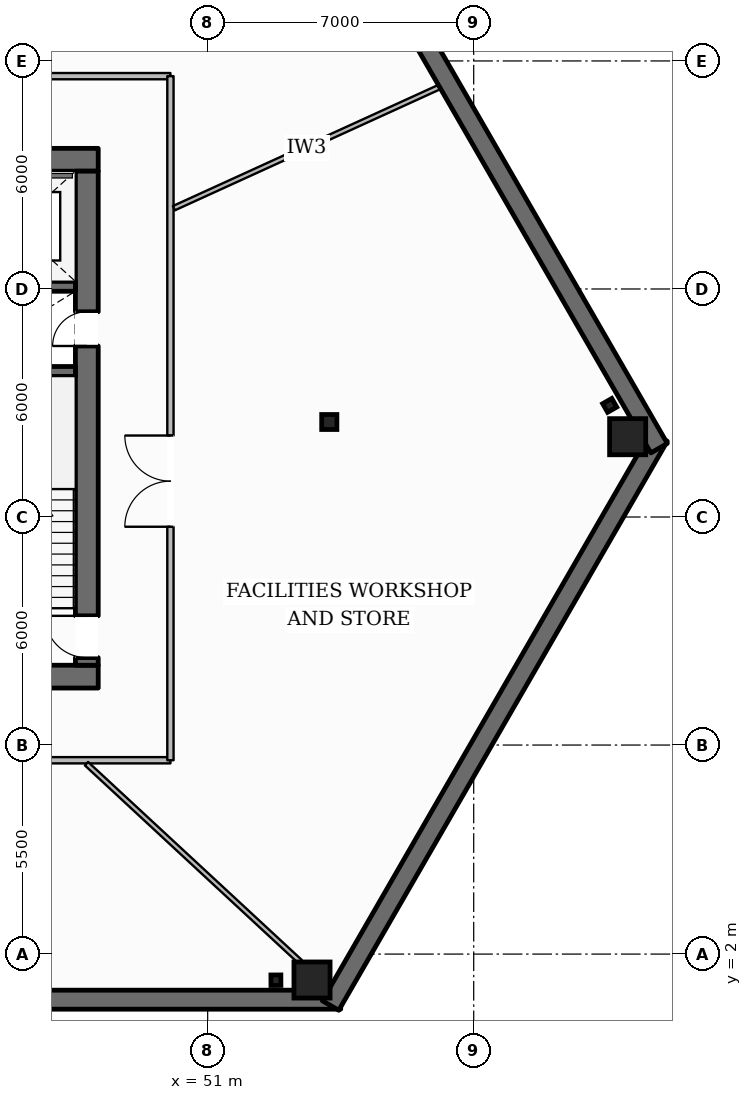
"""IFC4 building model, lengths in metres.
Left out: names, types, materials, properties, quantities, classifications, styles, units other than length and angle.
Written with IfcOpenShell. Run it as: python <this file> out.ifc"""

import sys

from ifc_helpers import new_model, si_unit, direction, frame, frame_2d, origin, origin_2d, place, context, subcontext, project, spatial, rectangle, hollow_rectangle, i_section, extrude, element, fill, save


model = new_model("IFC4")
c1 = context("Model", 3, precision=1e-05, world=origin(), true_north=direction((0.0, 1.0)))
c2 = subcontext(c1, "Body", "Model", "MODEL_VIEW")
j1 = project(units=[si_unit("LENGTHUNIT", "METRE"), si_unit("PLANEANGLEUNIT", "RADIAN")], contexts=[c1])
p1 = place(None, origin())
s1 = spatial("IfcSite", under=j1, at=p1, CompositionType="ELEMENT")
p2 = place(p1, origin())
s2 = spatial("IfcBuilding", under=s1, at=p2, CompositionType="ELEMENT")
p3 = place(p2, frame((0.0, 0.0, -4.2)))
s3 = spatial("IfcBuildingStorey", under=s2, at=p3, CompositionType="ELEMENT", Elevation=-4.2)
p4 = place(p3, frame((21.5, 0.8, 0.0), z_axis=(0.0, 0.0, 1.0), x_axis=(1.0, 0.0, 0.0)))
e1 = element("IfcWall", 1, at=p4, inside=s3, PredefinedType="SHEAR", context=c2, shape_type="SweptSolid", body=[
    extrude(rectangle(XDim=33.0, YDim=0.5, at=frame_2d((16.5, 0.0))), origin(), (0.0, 0.0, 1.0), 3.94),
])
p5 = place(p3, frame((54.233, 0.646, 0.0), z_axis=(0.0, 0.0, 1.0), x_axis=(0.499998305863, 0.866026381893, 0.0)))
e2 = element("IfcWall", 2, at=p5, inside=s3, PredefinedType="SHEAR", context=c2, shape_type="SweptSolid", body=[
    extrude(rectangle(XDim=17.289, YDim=0.5, at=frame_2d((8.644, 0.0))), origin(), (0.0, 0.0, 1.0), 3.94),
])
p6 = place(p3, frame((62.878, 15.311, 0.0), z_axis=(0.0, 0.0, 1.0), x_axis=(-0.499999749417, 0.866025548458, 0.0)))
e3 = element("IfcWall", 3, at=p6, inside=s3, PredefinedType="SHEAR", context=c2, shape_type="SweptSolid", body=[
    extrude(rectangle(XDim=33.0, YDim=0.5, at=frame_2d((16.5, 0.0))), origin(), (0.0, 0.0, 1.0), 3.94),
])
p7 = place(p3, frame((27.88, 9.3, 0.0), z_axis=(0.0, 0.0, 1.0), x_axis=(1.0, 0.0, 0.0)))
e4 = element("IfcWall", 4, at=p7, inside=s3, PredefinedType="SOLIDWALL", context=c2, shape_type="SweptSolid", body=[
    extrude(rectangle(XDim=20.24, YDim=0.6, at=frame_2d((10.12, 0.0))), origin(), (0.0, 0.0, 1.0), 3.94),
])
p8 = place(p7, frame((10.795, 0.0, 0.0)))
e5 = element("IfcOpeningElement", 5, at=p8, cuts=e4, PredefinedType="OPENING", context=c2, shape_type="SweptSolid", body=[
    extrude(rectangle(XDim=1.05, YDim=2.15, at=frame_2d((0.525, 1.075))), frame((0.0, 0.31, 0.0), z_axis=(0.0, -1.0, 0.0), x_axis=(1.0, 0.0, 0.0)), (0.0, 0.0, 1.0), 0.62),
])
p9 = place(p3, frame((27.88, 22.9, 0.0), z_axis=(0.0, 0.0, 1.0), x_axis=(1.0, 0.0, 0.0)))
e6 = element("IfcWall", 6, at=p9, inside=s3, PredefinedType="SOLIDWALL", context=c2, shape_type="SweptSolid", body=[
    extrude(rectangle(XDim=20.24, YDim=0.6, at=frame_2d((10.12, 0.0))), origin(), (0.0, 0.0, 1.0), 3.94),
])
p10 = place(p9, frame((6.395, 0.0, 0.0)))
e7 = element("IfcOpeningElement", 7, at=p10, cuts=e6, PredefinedType="OPENING", context=c2, shape_type="SweptSolid", body=[
    extrude(rectangle(XDim=1.05, YDim=2.15, at=frame_2d((0.525, 1.075))), frame((0.0, 0.31, 0.0), z_axis=(0.0, -1.0, 0.0), x_axis=(1.0, 0.0, 0.0)), (0.0, 0.0, 1.0), 0.62),
])
p11 = place(p9, frame((12.795, 0.0, 0.0)))
e8 = element("IfcOpeningElement", 8, at=p11, cuts=e6, PredefinedType="OPENING", context=c2, shape_type="SweptSolid", body=[
    extrude(rectangle(XDim=1.05, YDim=2.15, at=frame_2d((0.525, 1.075))), frame((0.0, 0.31, 0.0), z_axis=(0.0, -1.0, 0.0), x_axis=(1.0, 0.0, 0.0)), (0.0, 0.0, 1.0), 0.62),
])
p12 = place(p3, frame((47.82, 9.6, 0.0), z_axis=(0.0, 0.0, 1.0), x_axis=(0.0, 1.0, 0.0)))
e9 = element("IfcWall", 9, at=p12, inside=s3, PredefinedType="SOLIDWALL", context=c2, shape_type="SweptSolid", body=[
    extrude(rectangle(XDim=13.0, YDim=0.6, at=frame_2d((6.5, 0.0))), origin(), (0.0, 0.0, 1.0), 3.94),
])
p13 = place(p12, frame((0.2, 0.0, 0.0)))
e10 = element("IfcOpeningElement", 10, at=p13, cuts=e9, PredefinedType="OPENING", context=c2, shape_type="SweptSolid", body=[
    extrude(rectangle(XDim=1.1, YDim=2.15, at=frame_2d((0.55, 1.075))), frame((0.0, 0.31, 0.0), z_axis=(0.0, -1.0, 0.0), x_axis=(1.0, 0.0, 0.0)), (0.0, 0.0, 1.0), 0.62),
])
p14 = place(p12, frame((8.4, 0.0, 0.0)))
e11 = element("IfcOpeningElement", 11, at=p14, cuts=e9, PredefinedType="OPENING", context=c2, shape_type="SweptSolid", body=[
    extrude(rectangle(XDim=0.9, YDim=2.1, at=frame_2d((0.45, 1.05))), frame((0.0, 0.31, 0.0), z_axis=(0.0, -1.0, 0.0), x_axis=(1.0, 0.0, 0.0)), (0.0, 0.0, 1.0), 0.62),
])
for number, where, z_axis, x_axis in (
    (12, (44.32, 17.33, 0.0), (0.0, 0.0, 1.0), (1.0, 0.0, 0.0)),
    (13, (44.32, 19.57, 0.0), (0.0, 0.0, 1.0), (1.0, 0.0, 0.0)),
):
    element("IfcWall", number, at=place(p3, frame(where, z_axis=z_axis, x_axis=x_axis)), inside=s3, PredefinedType="SHEAR", context=c2, shape_type="SweptSolid", body=[
        extrude(rectangle(XDim=3.2, YDim=0.26, at=frame_2d((1.6, 0.0))), origin(), (0.0, 0.0, 1.0), 3.94),
    ])
for number, where, z_axis, x_axis in (
    (14, (53.746, 1.318, 0.0), (0.0, 0.0, 1.0), (1.0, 0.0, 0.0)),
    (15, (62.051, 15.613, 0.0), (0.0, 0.0, 1.0), (1.0, 0.0, 0.0)),
):
    element("IfcColumn", number, at=place(p3, frame(where, z_axis=z_axis, x_axis=x_axis)), inside=s3, PredefinedType="COLUMN", context=c2, shape_type="SweptSolid", body=[
        extrude(hollow_rectangle(XDim=0.95, YDim=0.95, WallThickness=0.04, at=origin_2d()), origin(), (0.0, 0.0, 1.0), 3.94),
    ])
for number, where, z_axis, x_axis in (
    (16, (52.795, 1.312, 0.0), (0.0, 0.0, 1.0), (1.0, 0.005, 0.0)),
    (17, (61.578, 16.437, 0.0), (0.0, 0.0, 1.0), (-0.498, 0.867, 0.0)),
):
    element("IfcColumn", number, at=place(p3, frame(where, z_axis=z_axis, x_axis=x_axis)), inside=s3, PredefinedType="PILASTER", context=c2, shape_type="SweptSolid", body=[
        extrude(i_section(OverallWidth=0.261, OverallDepth=0.276, WebThickness=0.015, FlangeThickness=0.025, at=origin_2d()), origin(), (0.0, 0.0, 1.0), 3.94),
    ])
p15 = place(p3, frame((54.2, 16.0, 0.0), z_axis=(0.0, 0.0, 1.0), x_axis=(1.0, 0.0, 0.0)))
e18 = element("IfcColumn", 18, at=p15, inside=s3, PredefinedType="COLUMN", context=c2, shape_type="SweptSolid", body=[
    extrude(i_section(OverallWidth=0.399, OverallDepth=0.394, WebThickness=0.023, FlangeThickness=0.037, at=origin_2d()), origin(), (0.0, 0.0, 1.0), 3.94),
])
p16 = place(p3, frame((25.98, 25.1, 0.0), z_axis=(0.0, 0.0, 1.0), x_axis=(1.0, 0.0, 0.0)))
e19 = element("IfcWall", 19, at=p16, inside=s3, PredefinedType="PARTITIONING", context=c2, shape_type="SweptSolid", body=[
    extrude(rectangle(XDim=24.04, YDim=0.165, at=frame_2d((12.02, 0.0))), origin(), (0.0, 0.0, 1.0), 3.94),
])
p17 = place(p16, frame((15.372, 0.0, 0.0)))
e20 = element("IfcOpeningElement", 20, at=p17, cuts=e19, PredefinedType="OPENING", context=c2, shape_type="SweptSolid", body=[
    extrude(rectangle(XDim=2.4, YDim=2.4, at=frame_2d((1.2, 1.2))), frame((0.0, 0.093, 0.0), z_axis=(0.0, -1.0, 0.0), x_axis=(1.0, 0.0, 0.0)), (0.0, 0.0, 1.0), 0.185),
])
p18 = place(p16, frame((3.517, 0.0, 0.0)))
e21 = element("IfcOpeningElement", 21, at=p18, cuts=e19, PredefinedType="OPENING", context=c2, shape_type="SweptSolid", body=[
    extrude(rectangle(XDim=2.4, YDim=2.4, at=frame_2d((1.2, 1.2))), frame((0.0, 0.093, 0.0), z_axis=(0.0, -1.0, 0.0), x_axis=(1.0, 0.0, 0.0)), (0.0, 0.0, 1.0), 0.185),
])
p19 = place(p3, frame((25.98, 7.1, 0.0), z_axis=(0.0, 0.0, 1.0), x_axis=(1.0, 0.0, 0.0)))
e22 = element("IfcWall", 22, at=p19, inside=s3, PredefinedType="PARTITIONING", context=c2, shape_type="SweptSolid", body=[
    extrude(rectangle(XDim=24.04, YDim=0.165, at=frame_2d((12.02, 0.0))), origin(), (0.0, 0.0, 1.0), 3.94),
])
p20 = place(p19, frame((4.58, 0.0, 0.0)))
e23 = element("IfcOpeningElement", 23, at=p20, cuts=e22, PredefinedType="OPENING", context=c2, shape_type="SweptSolid", body=[
    extrude(rectangle(XDim=0.88, YDim=2.1, at=frame_2d((0.44, 1.05))), frame((0.0, 0.093, 0.0), z_axis=(0.0, -1.0, 0.0), x_axis=(1.0, 0.0, 0.0)), (0.0, 0.0, 1.0), 0.185),
])
p21 = place(p19, frame((7.1, 0.0, 0.0)))
e24 = element("IfcOpeningElement", 24, at=p21, cuts=e22, PredefinedType="OPENING", context=c2, shape_type="SweptSolid", body=[
    extrude(rectangle(XDim=0.88, YDim=2.1, at=frame_2d((0.44, 1.05))), frame((0.0, 0.093, 0.0), z_axis=(0.0, -1.0, 0.0), x_axis=(1.0, 0.0, 0.0)), (0.0, 0.0, 1.0), 0.185),
])
p22 = place(p19, frame((9.48, 0.0, 0.0)))
e25 = element("IfcOpeningElement", 25, at=p22, cuts=e22, PredefinedType="OPENING", context=c2, shape_type="SweptSolid", body=[
    extrude(rectangle(XDim=0.96, YDim=2.1, at=frame_2d((0.48, 1.05))), frame((0.0, 0.093, 0.0), z_axis=(0.0, -1.0, 0.0), x_axis=(1.0, 0.0, 0.0)), (0.0, 0.0, 1.0), 0.185),
])
p23 = place(p19, frame((15.229, 0.0, 0.0)))
e26 = element("IfcOpeningElement", 26, at=p23, cuts=e22, PredefinedType="OPENING", context=c2, shape_type="SweptSolid", body=[
    extrude(rectangle(XDim=2.4, YDim=2.4, at=frame_2d((1.2, 1.2))), frame((0.0, 0.093, 0.0), z_axis=(0.0, -1.0, 0.0), x_axis=(1.0, 0.0, 0.0)), (0.0, 0.0, 1.0), 0.185),
])
p24 = place(p3, frame((50.02, 7.1, 0.0), z_axis=(0.0, 0.0, 1.0), x_axis=(0.0, 1.0, 0.0)))
e27 = element("IfcWall", 27, at=p24, inside=s3, PredefinedType="PARTITIONING", context=c2, shape_type="SweptSolid", body=[
    extrude(rectangle(XDim=18.0, YDim=0.165, at=frame_2d((9.0, 0.0))), origin(), (0.0, 0.0, 1.0), 3.628),
])
p25 = place(p24, frame((6.144, 0.0, 0.0)))
e28 = element("IfcOpeningElement", 28, at=p25, cuts=e27, PredefinedType="OPENING", context=c2, shape_type="SweptSolid", body=[
    extrude(rectangle(XDim=2.4, YDim=2.4, at=frame_2d((1.2, 1.2))), frame((0.0, 0.093, 0.0), z_axis=(0.0, -1.0, 0.0), x_axis=(1.0, 0.0, 0.0)), (0.0, 0.0, 1.0), 0.185),
])
p26 = place(p3, frame((50.111, 21.626, 0.0), z_axis=(0.0, 0.0, 1.0), x_axis=(0.909768462503, 0.415116061643, 0.0)))
e29 = element("IfcWall", 29, at=p26, inside=s3, PredefinedType="PARTITIONING", context=c2, shape_type="SweptSolid", body=[
    extrude(rectangle(XDim=7.674, YDim=0.125, at=frame_2d((3.837, 0.0))), origin(), (0.0, 0.0, 1.0), 3.94),
])
p27 = place(p3, frame((47.811, 7.01, 0.0), z_axis=(0.0, 0.0, 1.0), x_axis=(0.733527128647, -0.679660173571, 0.0)))
e30 = element("IfcWall", 30, at=p27, inside=s3, PredefinedType="PARTITIONING", context=c2, shape_type="SweptSolid", body=[
    extrude(rectangle(XDim=7.664, YDim=0.125, at=frame_2d((3.832, 0.0))), origin(), (0.0, 0.0, 1.0), 3.407),
])
p28 = place(p13, origin())
e31 = element("IfcDoor", 31, at=p28, inside=s3, OperationType="SINGLE_SWING_RIGHT", PredefinedType="DOOR", context=c2, shape_type="SweptSolid", body=[
    extrude(rectangle(XDim=1.1, YDim=2.15, at=frame_2d((0.55, 1.075))), frame((0.0, 0.025, 0.0), z_axis=(0.0, -1.0, 0.0), x_axis=(1.0, 0.0, 0.0)), (0.0, 0.0, 1.0), 0.05),
])
fill(e10, e31)
p29 = place(p14, origin())
e32 = element("IfcDoor", 32, at=p29, inside=s3, OperationType="SINGLE_SWING_LEFT", PredefinedType="DOOR", context=c2, shape_type="SweptSolid", body=[
    extrude(rectangle(XDim=0.9, YDim=2.1, at=frame_2d((0.45, 1.05))), frame((0.0, 0.025, 0.0), z_axis=(0.0, -1.0, 0.0), x_axis=(1.0, 0.0, 0.0)), (0.0, 0.0, 1.0), 0.05),
])
fill(e11, e32)
p30 = place(p25, origin())
e33 = element("IfcDoor", 33, at=p30, inside=s3, OperationType="DOUBLE_DOOR_SINGLE_SWING", PredefinedType="GATE", context=c2, shape_type="SweptSolid", body=[
    extrude(rectangle(XDim=2.4, YDim=2.4, at=frame_2d((1.2, 1.2))), frame((0.0, 0.025, 0.0), z_axis=(0.0, -1.0, 0.0), x_axis=(1.0, 0.0, 0.0)), (0.0, 0.0, 1.0), 0.05),
])
fill(e28, e33)
save(model, sys.argv[1])
